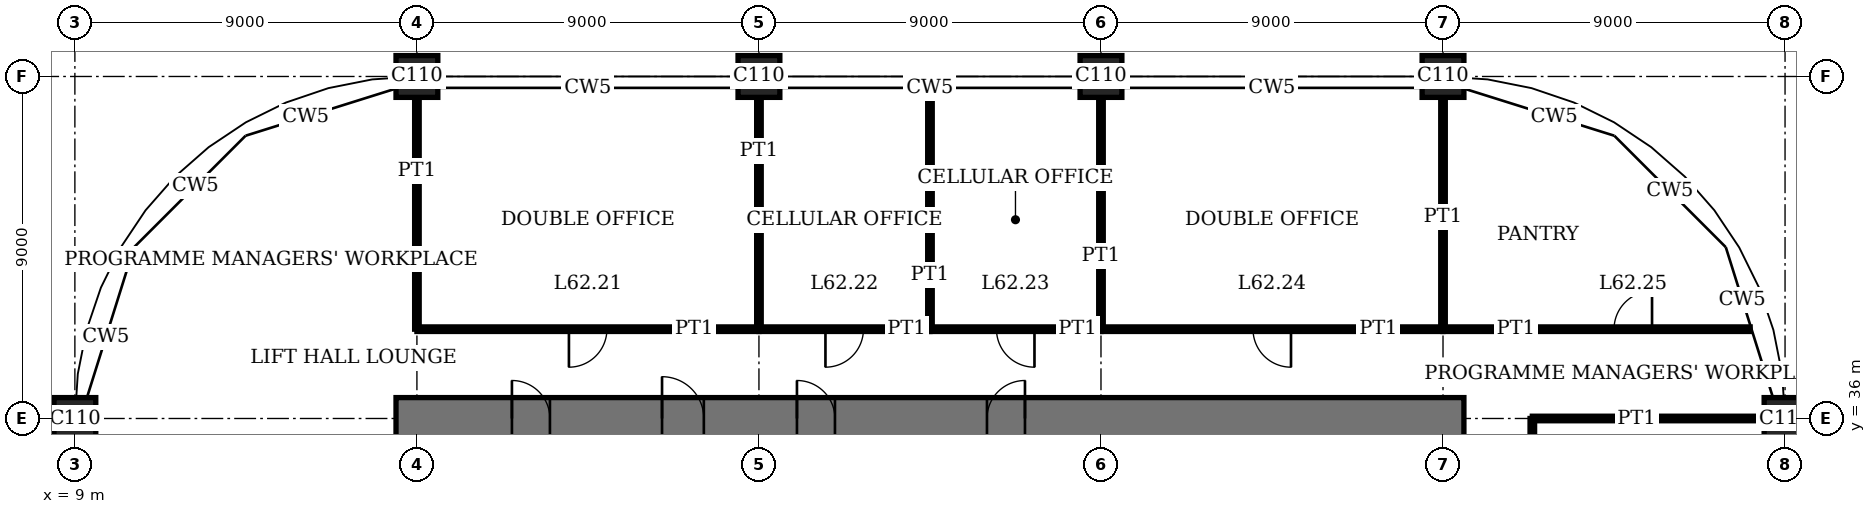
"""IFC4 building model, lengths in metres.
Left out: names, types, materials, properties, quantities, classifications, styles, units other than length and angle.
Written with IfcOpenShell. Run it as: python <this file> out.ifc"""

import sys

from ifc_helpers import new_model, si_unit, direction, frame, frame_2d, origin, origin_2d, place, context, subcontext, project, spatial, rectangle, extrude, element, fill, save


model = new_model("IFC4")
c1 = context("Model", 3, precision=1e-05, world=origin(), true_north=direction((0.0, 1.0)))
c2 = subcontext(c1, "Body", "Model", "MODEL_VIEW")
j1 = project(units=[si_unit("LENGTHUNIT", "METRE"), si_unit("PLANEANGLEUNIT", "RADIAN")], contexts=[c1])
p1 = place(None, origin())
s1 = spatial("IfcSite", under=j1, at=p1, CompositionType="ELEMENT")
p2 = place(p1, origin())
s2 = spatial("IfcBuilding", under=s1, at=p2, CompositionType="ELEMENT")
p3 = place(p2, frame((0.0, 0.0, 255.4)))
s3 = spatial("IfcBuildingStorey", under=s2, at=p3, CompositionType="ELEMENT", Elevation=255.4)
for number, where, z_axis, x_axis in (
    (1, (9.0, 36.0, 0.0), (0.0, 0.0, 1.0), (1.0, 0.0, 0.0)),
    (2, (18.0, 45.0, 0.0), (0.0, 0.0, 1.0), (1.0, 0.0, 0.0)),
    (3, (27.0, 45.0, 0.0), (0.0, 0.0, 1.0), (1.0, 0.0, 0.0)),
    (4, (36.0, 45.0, 0.0), (0.0, 0.0, 1.0), (1.0, 0.0, 0.0)),
    (5, (45.0, 45.0, 0.0), (0.0, 0.0, 1.0), (1.0, 0.0, 0.0)),
    (6, (54.0, 36.0, 0.0), (0.0, 0.0, 1.0), (1.0, 0.0, 0.0)),
):
    element("IfcColumn", number, at=place(p3, frame(where, z_axis=z_axis, x_axis=x_axis)), inside=s3, PredefinedType="COLUMN", context=c2, shape_type="SweptSolid", body=[
        extrude(rectangle(XDim=1.1, YDim=1.1, at=origin_2d()), origin(), (0.0, 0.0, 1.0), 4.0),
    ])
p4 = place(p3, frame((45.55, 36.0, 0.0), z_axis=(0.0, 0.0, 1.0), x_axis=(-1.0, 0.0, 0.0)))
e7 = element("IfcWall", 7, at=p4, inside=s3, PredefinedType="SHEAR", context=c2, shape_type="SweptSolid", body=[
    extrude(rectangle(XDim=28.1, YDim=1.1, at=frame_2d((14.05, 0.0))), origin(), (0.0, 0.0, 1.0), 4.0),
])
p5 = place(p4, frame((11.55, 0.0, 0.0)))
e8 = element("IfcOpeningElement", 8, at=p5, cuts=e7, PredefinedType="OPENING", context=c2, shape_type="SweptSolid", body=[
    extrude(rectangle(XDim=1.0, YDim=2.4, at=frame_2d((0.5, 1.2))), frame((0.0, 0.56, 0.0), z_axis=(0.0, -1.0, 0.0), x_axis=(1.0, 0.0, 0.0)), (0.0, 0.0, 1.0), 1.12),
])
p6 = place(p4, frame((16.55, 0.0, 0.0)))
e9 = element("IfcOpeningElement", 9, at=p6, cuts=e7, PredefinedType="OPENING", context=c2, shape_type="SweptSolid", body=[
    extrude(rectangle(XDim=1.0, YDim=2.4, at=frame_2d((0.5, 1.2))), frame((0.0, 0.56, 0.0), z_axis=(0.0, -1.0, 0.0), x_axis=(1.0, 0.0, 0.0)), (0.0, 0.0, 1.0), 1.12),
])
p7 = place(p4, frame((20.0, 0.0, 0.0)))
e10 = element("IfcOpeningElement", 10, at=p7, cuts=e7, PredefinedType="OPENING", context=c2, shape_type="SweptSolid", body=[
    extrude(rectangle(XDim=1.1, YDim=2.4, at=frame_2d((0.55, 1.2))), frame((0.0, 0.56, 0.0), z_axis=(0.0, -1.0, 0.0), x_axis=(1.0, 0.0, 0.0)), (0.0, 0.0, 1.0), 1.12),
])
p8 = place(p4, frame((24.05, 0.0, 0.0)))
e11 = element("IfcOpeningElement", 11, at=p8, cuts=e7, PredefinedType="OPENING", context=c2, shape_type="SweptSolid", body=[
    extrude(rectangle(XDim=1.0, YDim=2.4, at=frame_2d((0.5, 1.2))), frame((0.0, 0.56, 0.0), z_axis=(0.0, -1.0, 0.0), x_axis=(1.0, 0.0, 0.0)), (0.0, 0.0, 1.0), 1.12),
])
p9 = place(p3, frame((47.35, 36.0, 0.0), z_axis=(0.0, 0.0, 1.0), x_axis=(1.0, 0.0, 0.0)))
e12 = element("IfcWall", 12, at=p9, inside=s3, PredefinedType="PARTITIONING", context=c2, shape_type="SweptSolid", body=[
    extrude(rectangle(XDim=6.1, YDim=0.12, at=frame_2d((3.05, 0.0))), origin(), (0.0, 0.0, 1.0), 3.05),
])
p10 = place(p3, frame((18.0, 38.35, 0.0), z_axis=(0.0, 0.0, 1.0), x_axis=(1.0, 0.0, 0.0)))
e13 = element("IfcWall", 13, at=p10, inside=s3, PredefinedType="PARTITIONING", context=c2, shape_type="SweptSolid", body=[
    extrude(rectangle(XDim=9.0, YDim=0.12, at=frame_2d((4.5, 0.0))), origin(), (0.0, 0.0, 1.0), 3.75),
])
p11 = place(p10, frame((4.0, 0.0, 0.0)))
e14 = element("IfcOpeningElement", 14, at=p11, cuts=e13, PredefinedType="OPENING", context=c2, shape_type="SweptSolid", body=[
    extrude(rectangle(XDim=1.0, YDim=2.4, at=frame_2d((0.5, 1.2))), frame((0.0, 0.07, 0.0), z_axis=(0.0, -1.0, 0.0), x_axis=(1.0, 0.0, 0.0)), (0.0, 0.0, 1.0), 0.14),
])
p12 = place(p3, frame((27.0, 38.35, 0.0), z_axis=(0.0, 0.0, 1.0), x_axis=(1.0, 0.0, 0.0)))
e15 = element("IfcWall", 15, at=p12, inside=s3, PredefinedType="PARTITIONING", context=c2, shape_type="SweptSolid", body=[
    extrude(rectangle(XDim=4.5, YDim=0.12, at=frame_2d((2.25, 0.0))), origin(), (0.0, 0.0, 1.0), 3.75),
])
p13 = place(p12, frame((1.75, 0.0, 0.0)))
e16 = element("IfcOpeningElement", 16, at=p13, cuts=e15, PredefinedType="OPENING", context=c2, shape_type="SweptSolid", body=[
    extrude(rectangle(XDim=1.0, YDim=2.4, at=frame_2d((0.5, 1.2))), frame((0.0, 0.07, 0.0), z_axis=(0.0, -1.0, 0.0), x_axis=(1.0, 0.0, 0.0)), (0.0, 0.0, 1.0), 0.14),
])
p14 = place(p3, frame((31.5, 38.35, 0.0), z_axis=(0.0, 0.0, 1.0), x_axis=(1.0, 0.0, 0.0)))
e17 = element("IfcWall", 17, at=p14, inside=s3, PredefinedType="PARTITIONING", context=c2, shape_type="SweptSolid", body=[
    extrude(rectangle(XDim=4.5, YDim=0.12, at=frame_2d((2.25, 0.0))), origin(), (0.0, 0.0, 1.0), 3.75),
])
p15 = place(p14, frame((1.75, 0.0, 0.0)))
e18 = element("IfcOpeningElement", 18, at=p15, cuts=e17, PredefinedType="OPENING", context=c2, shape_type="SweptSolid", body=[
    extrude(rectangle(XDim=1.0, YDim=2.4, at=frame_2d((0.5, 1.2))), frame((0.0, 0.07, 0.0), z_axis=(0.0, -1.0, 0.0), x_axis=(1.0, 0.0, 0.0)), (0.0, 0.0, 1.0), 0.14),
])
p16 = place(p3, frame((36.0, 38.35, 0.0), z_axis=(0.0, 0.0, 1.0), x_axis=(1.0, 0.0, 0.0)))
e19 = element("IfcWall", 19, at=p16, inside=s3, PredefinedType="PARTITIONING", context=c2, shape_type="SweptSolid", body=[
    extrude(rectangle(XDim=9.0, YDim=0.12, at=frame_2d((4.5, 0.0))), origin(), (0.0, 0.0, 1.0), 3.75),
])
p17 = place(p16, frame((4.0, 0.0, 0.0)))
e20 = element("IfcOpeningElement", 20, at=p17, cuts=e19, PredefinedType="OPENING", context=c2, shape_type="SweptSolid", body=[
    extrude(rectangle(XDim=1.0, YDim=2.4, at=frame_2d((0.5, 1.2))), frame((0.0, 0.07, 0.0), z_axis=(0.0, -1.0, 0.0), x_axis=(1.0, 0.0, 0.0)), (0.0, 0.0, 1.0), 0.14),
])
p18 = place(p3, frame((45.0, 38.35, 0.0), z_axis=(0.0, 0.0, 1.0), x_axis=(1.0, 0.0, 0.0)))
e21 = element("IfcWall", 21, at=p18, inside=s3, PredefinedType="PARTITIONING", context=c2, shape_type="SweptSolid", body=[
    extrude(rectangle(XDim=8.082, YDim=0.12, at=frame_2d((4.041, 0.0))), origin(), (0.0, 0.0, 1.0), 3.75),
])
p19 = place(p18, frame((4.5, 0.0, 0.0)))
e22 = element("IfcOpeningElement", 22, at=p19, cuts=e21, PredefinedType="OPENING", context=c2, shape_type="SweptSolid", body=[
    extrude(rectangle(XDim=1.0, YDim=2.4, at=frame_2d((0.5, 1.2))), frame((0.0, 0.07, 0.0), z_axis=(0.0, -1.0, 0.0), x_axis=(1.0, 0.0, 0.0)), (0.0, 0.0, 1.0), 0.14),
])
for number, where, z_axis, x_axis in (
    (23, (18.0, 38.35, 0.0), (0.0, 0.0, 1.0), (0.0, 1.0, 0.0)),
    (24, (27.0, 38.35, 0.0), (0.0, 0.0, 1.0), (0.0, 1.0, 0.0)),
):
    element("IfcWall", number, at=place(p3, frame(where, z_axis=z_axis, x_axis=x_axis)), inside=s3, PredefinedType="PARTITIONING", context=c2, shape_type="SweptSolid", body=[
        extrude(rectangle(XDim=6.1, YDim=0.12, at=frame_2d((3.05, 0.0))), origin(), (0.0, 0.0, 1.0), 3.05),
    ])
p20 = place(p3, frame((31.5, 38.35, 0.0), z_axis=(0.0, 0.0, 1.0), x_axis=(0.0, 1.0, 0.0)))
e25 = element("IfcWall", 25, at=p20, inside=s3, PredefinedType="PARTITIONING", context=c2, shape_type="SweptSolid", body=[
    extrude(rectangle(XDim=6.34, YDim=0.12, at=frame_2d((3.17, 0.0))), origin(), (0.0, 0.0, 1.0), 3.75),
])
for number, where, z_axis, x_axis in (
    (26, (36.0, 38.35, 0.0), (0.0, 0.0, 1.0), (0.0, 1.0, 0.0)),
    (27, (45.0, 38.35, 0.0), (0.0, 0.0, 1.0), (0.0, 1.0, 0.0)),
):
    element("IfcWall", number, at=place(p3, frame(where, z_axis=z_axis, x_axis=x_axis)), inside=s3, PredefinedType="PARTITIONING", context=c2, shape_type="SweptSolid", body=[
        extrude(rectangle(XDim=6.1, YDim=0.12, at=frame_2d((3.05, 0.0))), origin(), (0.0, 0.0, 1.0), 3.05),
    ])
p21 = place(p3, frame((47.35, 31.5, 0.0), z_axis=(0.0, 0.0, 1.0), x_axis=(0.0, 1.0, 0.0)))
e28 = element("IfcWall", 28, at=p21, inside=s3, PredefinedType="PARTITIONING", context=c2, shape_type="SweptSolid", body=[
    extrude(rectangle(XDim=4.5, YDim=0.12, at=frame_2d((2.25, 0.0))), origin(), (0.0, 0.0, 1.0), 3.75),
])
p22 = place(p21, frame((1.75, 0.0, 0.0)))
e29 = element("IfcOpeningElement", 29, at=p22, cuts=e28, PredefinedType="OPENING", context=c2, shape_type="SweptSolid", body=[
    extrude(rectangle(XDim=1.0, YDim=2.4, at=frame_2d((0.5, 1.2))), frame((0.0, 0.07, 0.0), z_axis=(0.0, -1.0, 0.0), x_axis=(1.0, 0.0, 0.0)), (0.0, 0.0, 1.0), 0.14),
])
p23 = place(p5, origin())
e30 = element("IfcDoor", 30, at=p23, inside=s3, OperationType="SINGLE_SWING_LEFT", PredefinedType="DOOR", context=c2, shape_type="SweptSolid", body=[
    extrude(rectangle(XDim=1.0, YDim=2.4, at=frame_2d((0.5, 1.2))), frame((0.0, 0.025, 0.0), z_axis=(0.0, -1.0, 0.0), x_axis=(1.0, 0.0, 0.0)), (0.0, 0.0, 1.0), 0.05),
    extrude(rectangle(XDim=0.04, YDim=2.4, at=frame_2d((0.02, 1.2))), frame((0.0, 0.4, 0.0), z_axis=(0.0, -1.0, 0.0), x_axis=(1.0, 0.0, 0.0)), (0.0, 0.0, 1.0), 0.8),
    extrude(rectangle(XDim=0.04, YDim=2.4, at=frame_2d((0.98, 1.2))), frame((0.0, 0.4, 0.0), z_axis=(0.0, -1.0, 0.0), x_axis=(1.0, 0.0, 0.0)), (0.0, 0.0, 1.0), 0.8),
    extrude(rectangle(XDim=1.0, YDim=0.04, at=frame_2d((0.5, 2.38))), frame((0.0, 0.4, 0.0), z_axis=(0.0, -1.0, 0.0), x_axis=(1.0, 0.0, 0.0)), (0.0, 0.0, 1.0), 0.8),
])
fill(e8, e30)
p24 = place(p6, origin())
e31 = element("IfcDoor", 31, at=p24, inside=s3, OperationType="SINGLE_SWING_RIGHT", PredefinedType="DOOR", context=c2, shape_type="SweptSolid", body=[
    extrude(rectangle(XDim=1.0, YDim=2.4, at=frame_2d((0.5, 1.2))), frame((0.0, 0.025, 0.0), z_axis=(0.0, -1.0, 0.0), x_axis=(1.0, 0.0, 0.0)), (0.0, 0.0, 1.0), 0.05),
    extrude(rectangle(XDim=0.04, YDim=2.4, at=frame_2d((0.02, 1.2))), frame((0.0, 0.4, 0.0), z_axis=(0.0, -1.0, 0.0), x_axis=(1.0, 0.0, 0.0)), (0.0, 0.0, 1.0), 0.8),
    extrude(rectangle(XDim=0.04, YDim=2.4, at=frame_2d((0.98, 1.2))), frame((0.0, 0.4, 0.0), z_axis=(0.0, -1.0, 0.0), x_axis=(1.0, 0.0, 0.0)), (0.0, 0.0, 1.0), 0.8),
    extrude(rectangle(XDim=1.0, YDim=0.04, at=frame_2d((0.5, 2.38))), frame((0.0, 0.4, 0.0), z_axis=(0.0, -1.0, 0.0), x_axis=(1.0, 0.0, 0.0)), (0.0, 0.0, 1.0), 0.8),
])
fill(e9, e31)
p25 = place(p7, origin())
e32 = element("IfcDoor", 32, at=p25, inside=s3, OperationType="SINGLE_SWING_RIGHT", PredefinedType="DOOR", context=c2, shape_type="SweptSolid", body=[
    extrude(rectangle(XDim=1.1, YDim=2.4, at=frame_2d((0.55, 1.2))), frame((0.0, 0.025, 0.0), z_axis=(0.0, -1.0, 0.0), x_axis=(1.0, 0.0, 0.0)), (0.0, 0.0, 1.0), 0.05),
    extrude(rectangle(XDim=0.04, YDim=2.4, at=frame_2d((0.02, 1.2))), frame((0.0, 0.44, 0.0), z_axis=(0.0, -1.0, 0.0), x_axis=(1.0, 0.0, 0.0)), (0.0, 0.0, 1.0), 0.88),
    extrude(rectangle(XDim=0.04, YDim=2.4, at=frame_2d((1.08, 1.2))), frame((0.0, 0.44, 0.0), z_axis=(0.0, -1.0, 0.0), x_axis=(1.0, 0.0, 0.0)), (0.0, 0.0, 1.0), 0.88),
    extrude(rectangle(XDim=1.1, YDim=0.04, at=frame_2d((0.55, 2.38))), frame((0.0, 0.44, 0.0), z_axis=(0.0, -1.0, 0.0), x_axis=(1.0, 0.0, 0.0)), (0.0, 0.0, 1.0), 0.88),
])
fill(e10, e32)
p26 = place(p8, origin())
e33 = element("IfcDoor", 33, at=p26, inside=s3, OperationType="SINGLE_SWING_RIGHT", PredefinedType="DOOR", context=c2, shape_type="SweptSolid", body=[
    extrude(rectangle(XDim=1.0, YDim=2.4, at=frame_2d((0.5, 1.2))), frame((0.0, 0.025, 0.0), z_axis=(0.0, -1.0, 0.0), x_axis=(1.0, 0.0, 0.0)), (0.0, 0.0, 1.0), 0.05),
    extrude(rectangle(XDim=0.04, YDim=2.4, at=frame_2d((0.02, 1.2))), frame((0.0, 0.4, 0.0), z_axis=(0.0, -1.0, 0.0), x_axis=(1.0, 0.0, 0.0)), (0.0, 0.0, 1.0), 0.8),
    extrude(rectangle(XDim=0.04, YDim=2.4, at=frame_2d((0.98, 1.2))), frame((0.0, 0.4, 0.0), z_axis=(0.0, -1.0, 0.0), x_axis=(1.0, 0.0, 0.0)), (0.0, 0.0, 1.0), 0.8),
    extrude(rectangle(XDim=1.0, YDim=0.04, at=frame_2d((0.5, 2.38))), frame((0.0, 0.4, 0.0), z_axis=(0.0, -1.0, 0.0), x_axis=(1.0, 0.0, 0.0)), (0.0, 0.0, 1.0), 0.8),
])
fill(e11, e33)
p27 = place(p11, origin())
e34 = element("IfcDoor", 34, at=p27, inside=s3, OperationType="SINGLE_SWING_LEFT", PredefinedType="DOOR", context=c2, shape_type="SweptSolid", body=[
    extrude(rectangle(XDim=1.0, YDim=2.4, at=frame_2d((0.5, 1.2))), frame((0.0, 0.025, 0.0), z_axis=(0.0, -1.0, 0.0), x_axis=(1.0, 0.0, 0.0)), (0.0, 0.0, 1.0), 0.05),
])
fill(e14, e34)
p28 = place(p13, origin())
e35 = element("IfcDoor", 35, at=p28, inside=s3, OperationType="SINGLE_SWING_LEFT", PredefinedType="DOOR", context=c2, shape_type="SweptSolid", body=[
    extrude(rectangle(XDim=1.0, YDim=2.4, at=frame_2d((0.5, 1.2))), frame((0.0, 0.025, 0.0), z_axis=(0.0, -1.0, 0.0), x_axis=(1.0, 0.0, 0.0)), (0.0, 0.0, 1.0), 0.05),
])
fill(e16, e35)
p29 = place(p15, origin())
e36 = element("IfcDoor", 36, at=p29, inside=s3, OperationType="SINGLE_SWING_RIGHT", PredefinedType="DOOR", context=c2, shape_type="SweptSolid", body=[
    extrude(rectangle(XDim=1.0, YDim=2.4, at=frame_2d((0.5, 1.2))), frame((0.0, 0.025, 0.0), z_axis=(0.0, -1.0, 0.0), x_axis=(1.0, 0.0, 0.0)), (0.0, 0.0, 1.0), 0.05),
])
fill(e18, e36)
p30 = place(p17, origin())
e37 = element("IfcDoor", 37, at=p30, inside=s3, OperationType="SINGLE_SWING_RIGHT", PredefinedType="DOOR", context=c2, shape_type="SweptSolid", body=[
    extrude(rectangle(XDim=1.0, YDim=2.4, at=frame_2d((0.5, 1.2))), frame((0.0, 0.025, 0.0), z_axis=(0.0, -1.0, 0.0), x_axis=(1.0, 0.0, 0.0)), (0.0, 0.0, 1.0), 0.05),
])
fill(e20, e37)
p31 = place(p19, origin())
e38 = element("IfcDoor", 38, at=p31, inside=s3, OperationType="SINGLE_SWING_LEFT", PredefinedType="DOOR", context=c2, shape_type="SweptSolid", body=[
    extrude(rectangle(XDim=1.0, YDim=2.4, at=frame_2d((0.5, 1.2))), frame((0.0, 0.025, 0.0), z_axis=(0.0, -1.0, 0.0), x_axis=(1.0, 0.0, 0.0)), (0.0, 0.0, 1.0), 0.05),
])
fill(e22, e38)
save(model, sys.argv[1])
